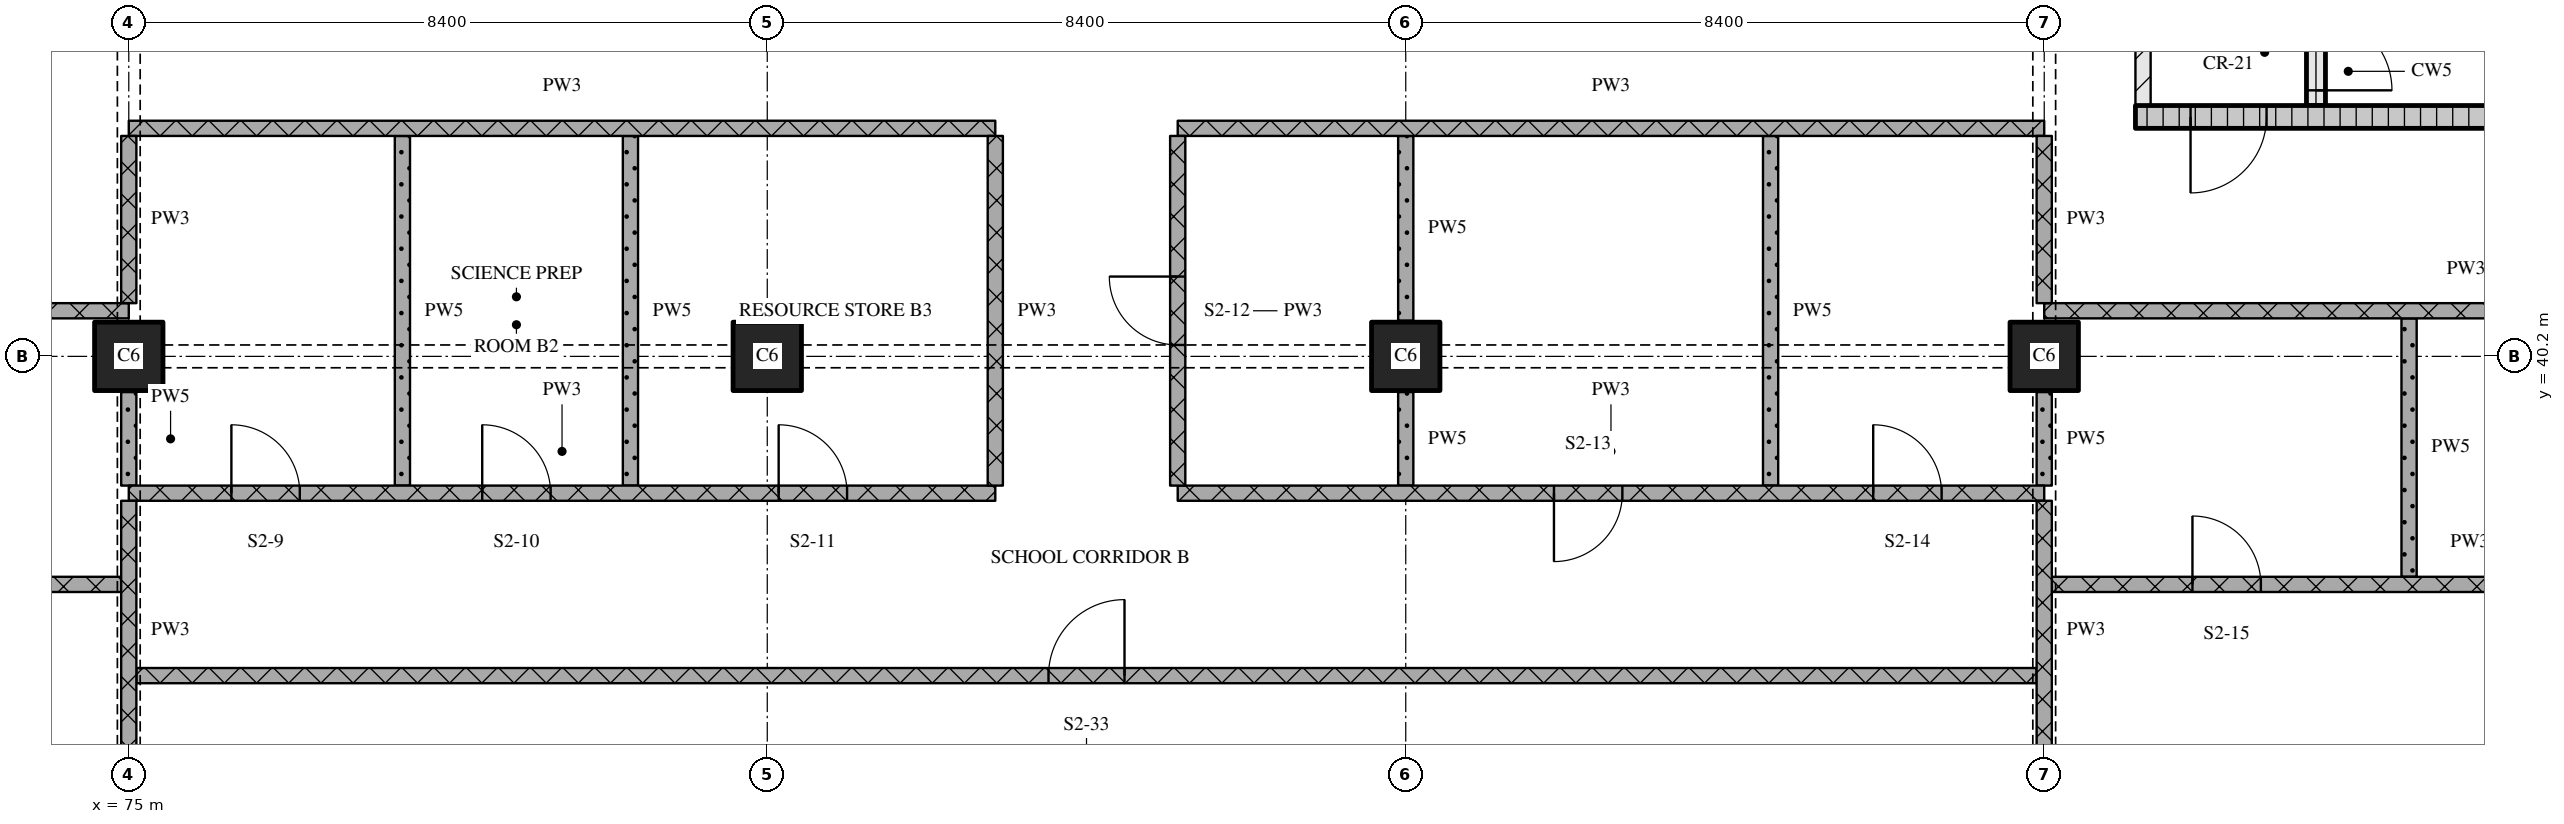
"""IFC4 building model, lengths in metres.
Left out: names, types, materials, properties, quantities, classifications, styles, units other than length and angle.
Written with IfcOpenShell. Run it as: python <this file> out.ifc"""

import sys

from ifc_helpers import new_model, si_unit, direction, frame, frame_2d, origin, origin_2d, place, context, subcontext, project, spatial, rectangle, extrude, element, fill, save


model = new_model("IFC4")
c1 = context("Model", 3, precision=1e-05, world=origin(), true_north=direction((0.0, 1.0)))
c2 = subcontext(c1, "Body", "Model", "MODEL_VIEW")
j1 = project(units=[si_unit("LENGTHUNIT", "METRE"), si_unit("PLANEANGLEUNIT", "RADIAN")], contexts=[c1])
p1 = place(None, origin())
s1 = spatial("IfcSite", under=j1, at=p1, CompositionType="ELEMENT")
p2 = place(p1, origin())
s2 = spatial("IfcBuilding", under=s1, at=p2, CompositionType="ELEMENT")
p3 = place(p2, frame((0.0, 0.0, 32.7)))
s3 = spatial("IfcBuildingStorey", under=s2, at=p3, CompositionType="ELEMENT", Elevation=32.7)
for number, where, z_axis, x_axis in (
    (1, (75.0, 40.2, 0.0), (0.0, 0.0, 1.0), (1.0, 0.0, 0.0)),
    (2, (83.4, 40.2, 0.0), (0.0, 0.0, 1.0), (1.0, 0.0, 0.0)),
    (3, (91.8, 40.2, 0.0), (0.0, 0.0, 1.0), (1.0, 0.0, 0.0)),
    (4, (100.2, 40.2, 0.0), (0.0, 0.0, 1.0), (1.0, 0.0, 0.0)),
):
    element("IfcColumn", number, at=place(p3, frame(where, z_axis=z_axis, x_axis=x_axis)), inside=s3, PredefinedType="COLUMN", context=c2, shape_type="SweptSolid", body=[
        extrude(rectangle(XDim=0.9, YDim=0.9, at=origin_2d()), origin(), (0.0, 0.0, 1.0), 4.5),
    ])
p4 = place(p3, frame((101.4, 43.35, 0.0), z_axis=(0.0, 0.0, 1.0), x_axis=(1.0, 0.0, 0.0)))
e5 = element("IfcWall", 5, at=p4, inside=s3, PredefinedType="SOLIDWALL", context=c2, shape_type="SweptSolid", body=[
    extrude(rectangle(XDim=5.6, YDim=0.3, at=frame_2d((2.8, 0.0))), origin(), (0.0, 0.0, 1.0), 4.22),
])
p5 = place(p4, frame((0.725, 0.0, 0.0)))
e6 = element("IfcOpeningElement", 6, at=p5, cuts=e5, PredefinedType="OPENING", context=c2, shape_type="SweptSolid", body=[
    extrude(rectangle(XDim=1.0, YDim=2.1, at=frame_2d((0.5, 1.05))), frame((0.0, 0.16, 0.0), z_axis=(0.0, -1.0, 0.0), x_axis=(1.0, 0.0, 0.0)), (0.0, 0.0, 1.0), 0.32),
])
p6 = place(p3, frame((101.5, 43.5, 0.0), z_axis=(0.0, 0.0, 1.0), x_axis=(0.0, 1.0, 0.0)))
e7 = element("IfcWall", 7, at=p6, inside=s3, PredefinedType="PARTITIONING", context=c2, shape_type="SweptSolid", body=[
    extrude(rectangle(XDim=6.9, YDim=0.2, at=frame_2d((3.45, 0.0))), origin(), (0.0, 0.0, 1.0), 4.22),
])
p7 = place(p6, frame((1.0, 0.0, 0.0)))
e8 = element("IfcOpeningElement", 8, at=p7, cuts=e7, PredefinedType="OPENING", context=c2, shape_type="SweptSolid", body=[
    extrude(rectangle(XDim=1.0, YDim=2.1, at=frame_2d((0.5, 1.05))), frame((0.0, 0.11, 0.0), z_axis=(0.0, -1.0, 0.0), x_axis=(1.0, 0.0, 0.0)), (0.0, 0.0, 1.0), 0.22),
])
p8 = place(p3, frame((103.775, 43.5, 0.0), z_axis=(0.0, 0.0, 1.0), x_axis=(0.0, 1.0, 0.0)))
e9 = element("IfcWall", 9, at=p8, inside=s3, PredefinedType="SOLIDWALL", context=c2, shape_type="SweptSolid", body=[
    extrude(rectangle(XDim=6.9, YDim=0.25, at=frame_2d((3.45, 0.0))), origin(), (0.0, 0.0, 1.0), 4.22),
])
p9 = place(p8, frame((0.2, 0.0, 0.0)))
e10 = element("IfcOpeningElement", 10, at=p9, cuts=e9, PredefinedType="OPENING", context=c2, shape_type="SweptSolid", body=[
    extrude(rectangle(XDim=1.0, YDim=2.1, at=frame_2d((0.5, 1.05))), frame((0.0, 0.135, 0.0), z_axis=(0.0, -1.0, 0.0), x_axis=(1.0, 0.0, 0.0)), (0.0, 0.0, 1.0), 0.27),
])
p10 = place(p3, frame((100.1, 36.0, 0.0), z_axis=(0.0, 0.0, 1.0), x_axis=(-1.0, 0.0, 0.0)))
e11 = element("IfcWall", 11, at=p10, inside=s3, PredefinedType="PARTITIONING", context=c2, shape_type="SweptSolid", body=[
    extrude(rectangle(XDim=25.0, YDim=0.2, at=frame_2d((12.5, 0.0))), origin(), (0.0, 0.0, 1.0), 4.22),
])
p11 = place(p10, frame((12.0, 0.0, 0.0)))
e12 = element("IfcOpeningElement", 12, at=p11, cuts=e11, PredefinedType="OPENING", context=c2, shape_type="SweptSolid", body=[
    extrude(rectangle(XDim=1.0, YDim=2.1, at=frame_2d((0.5, 1.05))), frame((0.0, 0.11, 0.0), z_axis=(0.0, -1.0, 0.0), x_axis=(1.0, 0.0, 0.0)), (0.0, 0.0, 1.0), 0.22),
])
p12 = place(p3, frame((63.9, 37.2, 0.0), z_axis=(0.0, 0.0, 1.0), x_axis=(1.0, 0.0, 0.0)))
e13 = element("IfcWall", 13, at=p12, inside=s3, PredefinedType="PARTITIONING", context=c2, shape_type="SweptSolid", body=[
    extrude(rectangle(XDim=11.0, YDim=0.2, at=frame_2d((5.5, 0.0))), origin(), (0.0, 0.0, 1.0), 4.22),
])
p13 = place(p12, frame((7.5, 0.0, 0.0)))
e14 = element("IfcOpeningElement", 14, at=p13, cuts=e13, PredefinedType="OPENING", context=c2, shape_type="SweptSolid", body=[
    extrude(rectangle(XDim=0.9, YDim=2.1, at=frame_2d((0.45, 1.05))), frame((0.0, 0.11, 0.0), z_axis=(0.0, -1.0, 0.0), x_axis=(1.0, 0.0, 0.0)), (0.0, 0.0, 1.0), 0.22),
])
p14 = place(p3, frame((100.3, 37.2, 0.0), z_axis=(0.0, 0.0, 1.0), x_axis=(1.0, 0.0, 0.0)))
e15 = element("IfcWall", 15, at=p14, inside=s3, PredefinedType="PARTITIONING", context=c2, shape_type="SweptSolid", body=[
    extrude(rectangle(XDim=11.0, YDim=0.2, at=frame_2d((5.5, 0.0))), origin(), (0.0, 0.0, 1.0), 4.22),
])
p15 = place(p14, frame((1.85, 0.0, 0.0)))
e16 = element("IfcOpeningElement", 16, at=p15, cuts=e15, PredefinedType="OPENING", context=c2, shape_type="SweptSolid", body=[
    extrude(rectangle(XDim=0.9, YDim=2.1, at=frame_2d((0.45, 1.05))), frame((0.0, 0.11, 0.0), z_axis=(0.0, -1.0, 0.0), x_axis=(1.0, 0.0, 0.0)), (0.0, 0.0, 1.0), 0.22),
])
p16 = place(p14, frame((7.4, 0.0, 0.0)))
e17 = element("IfcOpeningElement", 17, at=p16, cuts=e15, PredefinedType="OPENING", context=c2, shape_type="SweptSolid", body=[
    extrude(rectangle(XDim=0.9, YDim=2.1, at=frame_2d((0.45, 1.05))), frame((0.0, 0.11, 0.0), z_axis=(0.0, -1.0, 0.0), x_axis=(1.0, 0.0, 0.0)), (0.0, 0.0, 1.0), 0.22),
])
p17 = place(p3, frame((75.0, 38.4, 0.0), z_axis=(0.0, 0.0, 1.0), x_axis=(1.0, 0.0, 0.0)))
e18 = element("IfcWall", 18, at=p17, inside=s3, PredefinedType="PARTITIONING", context=c2, shape_type="SweptSolid", body=[
    extrude(rectangle(XDim=11.4, YDim=0.2, at=frame_2d((5.7, 0.0))), origin(), (0.0, 0.0, 1.0), 4.22),
])
p18 = place(p17, frame((1.35, 0.0, 0.0)))
e19 = element("IfcOpeningElement", 19, at=p18, cuts=e18, PredefinedType="OPENING", context=c2, shape_type="SweptSolid", body=[
    extrude(rectangle(XDim=0.9, YDim=2.1, at=frame_2d((0.45, 1.05))), frame((0.0, 0.11, 0.0), z_axis=(0.0, -1.0, 0.0), x_axis=(1.0, 0.0, 0.0)), (0.0, 0.0, 1.0), 0.22),
])
p19 = place(p17, frame((4.65, 0.0, 0.0)))
e20 = element("IfcOpeningElement", 20, at=p19, cuts=e18, PredefinedType="OPENING", context=c2, shape_type="SweptSolid", body=[
    extrude(rectangle(XDim=0.9, YDim=2.1, at=frame_2d((0.45, 1.05))), frame((0.0, 0.11, 0.0), z_axis=(0.0, -1.0, 0.0), x_axis=(1.0, 0.0, 0.0)), (0.0, 0.0, 1.0), 0.22),
])
p20 = place(p17, frame((8.55, 0.0, 0.0)))
e21 = element("IfcOpeningElement", 21, at=p20, cuts=e18, PredefinedType="OPENING", context=c2, shape_type="SweptSolid", body=[
    extrude(rectangle(XDim=0.9, YDim=2.1, at=frame_2d((0.45, 1.05))), frame((0.0, 0.11, 0.0), z_axis=(0.0, -1.0, 0.0), x_axis=(1.0, 0.0, 0.0)), (0.0, 0.0, 1.0), 0.22),
])
p21 = place(p3, frame((88.8, 38.4, 0.0), z_axis=(0.0, 0.0, 1.0), x_axis=(1.0, 0.0, 0.0)))
e22 = element("IfcWall", 22, at=p21, inside=s3, PredefinedType="PARTITIONING", context=c2, shape_type="SweptSolid", body=[
    extrude(rectangle(XDim=11.4, YDim=0.2, at=frame_2d((5.7, 0.0))), origin(), (0.0, 0.0, 1.0), 4.22),
])
p22 = place(p21, frame((4.95, 0.0, 0.0)))
e23 = element("IfcOpeningElement", 23, at=p22, cuts=e22, PredefinedType="OPENING", context=c2, shape_type="SweptSolid", body=[
    extrude(rectangle(XDim=0.9, YDim=2.1, at=frame_2d((0.45, 1.05))), frame((0.0, 0.11, 0.0), z_axis=(0.0, -1.0, 0.0), x_axis=(1.0, 0.0, 0.0)), (0.0, 0.0, 1.0), 0.22),
])
p23 = place(p21, frame((9.15, 0.0, 0.0)))
e24 = element("IfcOpeningElement", 24, at=p23, cuts=e22, PredefinedType="OPENING", context=c2, shape_type="SweptSolid", body=[
    extrude(rectangle(XDim=0.9, YDim=2.1, at=frame_2d((0.45, 1.05))), frame((0.0, 0.11, 0.0), z_axis=(0.0, -1.0, 0.0), x_axis=(1.0, 0.0, 0.0)), (0.0, 0.0, 1.0), 0.22),
])
for number, where, z_axis, x_axis in (
    (25, (63.9, 40.8, 0.0), (0.0, 0.0, 1.0), (1.0, 0.0, 0.0)),
    (26, (100.2, 40.8, 0.0), (0.0, 0.0, 1.0), (1.0, 0.0, 0.0)),
):
    element("IfcWall", number, at=place(p3, frame(where, z_axis=z_axis, x_axis=x_axis)), inside=s3, PredefinedType="PARTITIONING", context=c2, shape_type="SweptSolid", body=[
        extrude(rectangle(XDim=11.1, YDim=0.2, at=frame_2d((5.55, 0.0))), origin(), (0.0, 0.0, 1.0), 4.22),
    ])
for number, where, z_axis, x_axis in (
    (27, (75.0, 43.2, 0.0), (0.0, 0.0, 1.0), (1.0, 0.0, 0.0)),
    (28, (88.8, 43.2, 0.0), (0.0, 0.0, 1.0), (1.0, 0.0, 0.0)),
):
    element("IfcWall", number, at=place(p3, frame(where, z_axis=z_axis, x_axis=x_axis)), inside=s3, PredefinedType="PARTITIONING", context=c2, shape_type="SweptSolid", body=[
        extrude(rectangle(XDim=11.4, YDim=0.2, at=frame_2d((5.7, 0.0))), origin(), (0.0, 0.0, 1.0), 4.22),
    ])
p24 = place(p3, frame((75.0, 38.3, 0.0), z_axis=(0.0, 0.0, 1.0), x_axis=(0.0, -1.0, 0.0)))
e29 = element("IfcWall", 29, at=p24, inside=s3, PredefinedType="PARTITIONING", context=c2, shape_type="SweptSolid", body=[
    extrude(rectangle(XDim=3.4, YDim=0.2, at=frame_2d((1.7, 0.0))), origin(), (0.0, 0.0, 1.0), 3.73),
])
p25 = place(p3, frame((75.0, 43.1, 0.0), z_axis=(0.0, 0.0, 1.0), x_axis=(0.0, -1.0, 0.0)))
e30 = element("IfcWall", 30, at=p25, inside=s3, PredefinedType="PARTITIONING", context=c2, shape_type="SweptSolid", body=[
    extrude(rectangle(XDim=2.2, YDim=0.2, at=frame_2d((1.1, 0.0))), origin(), (0.0, 0.0, 1.0), 3.33),
])
p26 = place(p3, frame((75.0, 39.73, 0.0), z_axis=(0.0, 0.0, 1.0), x_axis=(0.0, -1.0, 0.0)))
e31 = element("IfcWall", 31, at=p26, inside=s3, PredefinedType="PARTITIONING", context=c2, shape_type="SweptSolid", body=[
    extrude(rectangle(XDim=1.23, YDim=0.2, at=frame_2d((0.615, 0.0))), origin(), (0.0, 0.0, 1.0), 3.73),
])
for number, where, z_axis, x_axis in (
    (32, (78.6, 43.1, 0.0), (0.0, 0.0, 1.0), (0.0, -1.0, 0.0)),
    (33, (81.6, 43.1, 0.0), (0.0, 0.0, 1.0), (0.0, -1.0, 0.0)),
    (34, (86.4, 43.1, 0.0), (0.0, 0.0, 1.0), (0.0, -1.0, 0.0)),
):
    element("IfcWall", number, at=place(p3, frame(where, z_axis=z_axis, x_axis=x_axis)), inside=s3, PredefinedType="PARTITIONING", context=c2, shape_type="SweptSolid", body=[
        extrude(rectangle(XDim=4.6, YDim=0.2, at=frame_2d((2.3, 0.0))), origin(), (0.0, 0.0, 1.0), 4.22),
    ])
p27 = place(p3, frame((88.8, 43.1, 0.0), z_axis=(0.0, 0.0, 1.0), x_axis=(0.0, -1.0, 0.0)))
e35 = element("IfcWall", 35, at=p27, inside=s3, PredefinedType="PARTITIONING", context=c2, shape_type="SweptSolid", body=[
    extrude(rectangle(XDim=4.6, YDim=0.2, at=frame_2d((2.3, 0.0))), origin(), (0.0, 0.0, 1.0), 4.22),
])
p28 = place(p27, frame((1.85, 0.0, 0.0)))
e36 = element("IfcOpeningElement", 36, at=p28, cuts=e35, PredefinedType="OPENING", context=c2, shape_type="SweptSolid", body=[
    extrude(rectangle(XDim=0.9, YDim=2.1, at=frame_2d((0.45, 1.05))), frame((0.0, 0.11, 0.0), z_axis=(0.0, -1.0, 0.0), x_axis=(1.0, 0.0, 0.0)), (0.0, 0.0, 1.0), 0.22),
])
p29 = place(p3, frame((91.8, 39.73, 0.0), z_axis=(0.0, 0.0, 1.0), x_axis=(0.0, -1.0, 0.0)))
e37 = element("IfcWall", 37, at=p29, inside=s3, PredefinedType="PARTITIONING", context=c2, shape_type="SweptSolid", body=[
    extrude(rectangle(XDim=1.23, YDim=0.2, at=frame_2d((0.615, 0.0))), origin(), (0.0, 0.0, 1.0), 4.22),
])
p30 = place(p3, frame((91.8, 43.1, 0.0), z_axis=(0.0, 0.0, 1.0), x_axis=(0.0, -1.0, 0.0)))
e38 = element("IfcWall", 38, at=p30, inside=s3, PredefinedType="PARTITIONING", context=c2, shape_type="SweptSolid", body=[
    extrude(rectangle(XDim=2.43, YDim=0.2, at=frame_2d((1.215, 0.0))), origin(), (0.0, 0.0, 1.0), 4.22),
])
p31 = place(p3, frame((96.6, 43.1, 0.0), z_axis=(0.0, 0.0, 1.0), x_axis=(0.0, -1.0, 0.0)))
e39 = element("IfcWall", 39, at=p31, inside=s3, PredefinedType="PARTITIONING", context=c2, shape_type="SweptSolid", body=[
    extrude(rectangle(XDim=4.6, YDim=0.2, at=frame_2d((2.3, 0.0))), origin(), (0.0, 0.0, 1.0), 4.22),
])
p32 = place(p3, frame((100.2, 38.3, 0.0), z_axis=(0.0, 0.0, 1.0), x_axis=(0.0, -1.0, 0.0)))
e40 = element("IfcWall", 40, at=p32, inside=s3, PredefinedType="PARTITIONING", context=c2, shape_type="SweptSolid", body=[
    extrude(rectangle(XDim=3.4, YDim=0.2, at=frame_2d((1.7, 0.0))), origin(), (0.0, 0.0, 1.0), 3.73),
])
p33 = place(p3, frame((100.2, 43.1, 0.0), z_axis=(0.0, 0.0, 1.0), x_axis=(0.0, -1.0, 0.0)))
e41 = element("IfcWall", 41, at=p33, inside=s3, PredefinedType="PARTITIONING", context=c2, shape_type="SweptSolid", body=[
    extrude(rectangle(XDim=2.2, YDim=0.2, at=frame_2d((1.1, 0.0))), origin(), (0.0, 0.0, 1.0), 3.33),
])
p34 = place(p3, frame((100.2, 39.73, 0.0), z_axis=(0.0, 0.0, 1.0), x_axis=(0.0, -1.0, 0.0)))
e42 = element("IfcWall", 42, at=p34, inside=s3, PredefinedType="PARTITIONING", context=c2, shape_type="SweptSolid", body=[
    extrude(rectangle(XDim=1.23, YDim=0.2, at=frame_2d((0.615, 0.0))), origin(), (0.0, 0.0, 1.0), 3.73),
])
p35 = place(p3, frame((105.0, 40.7, 0.0), z_axis=(0.0, 0.0, 1.0), x_axis=(0.0, -1.0, 0.0)))
e43 = element("IfcWall", 43, at=p35, inside=s3, PredefinedType="PARTITIONING", context=c2, shape_type="SweptSolid", body=[
    extrude(rectangle(XDim=3.4, YDim=0.2, at=frame_2d((1.7, 0.0))), origin(), (0.0, 0.0, 1.0), 4.22),
])
p36 = place(p5, origin())
e44 = element("IfcDoor", 44, at=p36, inside=s3, OperationType="SINGLE_SWING_RIGHT", PredefinedType="DOOR", context=c2, shape_type="SweptSolid", body=[
    extrude(rectangle(XDim=1.0, YDim=2.1, at=frame_2d((0.5, 1.05))), frame((0.0, 0.025, 0.0), z_axis=(0.0, -1.0, 0.0), x_axis=(1.0, 0.0, 0.0)), (0.0, 0.0, 1.0), 0.05),
])
fill(e6, e44)
p37 = place(p9, origin())
e45 = element("IfcDoor", 45, at=p37, inside=s3, OperationType="SINGLE_SWING_RIGHT", PredefinedType="DOOR", context=c2, shape_type="SweptSolid", body=[
    extrude(rectangle(XDim=1.0, YDim=2.1, at=frame_2d((0.5, 1.05))), frame((0.0, 0.025, 0.0), z_axis=(0.0, -1.0, 0.0), x_axis=(1.0, 0.0, 0.0)), (0.0, 0.0, 1.0), 0.05),
])
fill(e10, e45)
p38 = place(p11, origin())
e46 = element("IfcDoor", 46, at=p38, inside=s3, OperationType="SINGLE_SWING_RIGHT", PredefinedType="DOOR", context=c2, shape_type="SweptSolid", body=[
    extrude(rectangle(XDim=1.0, YDim=2.1, at=frame_2d((0.5, 1.05))), frame((0.0, 0.025, 0.0), z_axis=(0.0, -1.0, 0.0), x_axis=(1.0, 0.0, 0.0)), (0.0, 0.0, 1.0), 0.05),
])
fill(e12, e46)
p39 = place(p15, origin())
e47 = element("IfcDoor", 47, at=p39, inside=s3, OperationType="SINGLE_SWING_LEFT", PredefinedType="DOOR", context=c2, shape_type="SweptSolid", body=[
    extrude(rectangle(XDim=0.9, YDim=2.1, at=frame_2d((0.45, 1.05))), frame((0.0, 0.025, 0.0), z_axis=(0.0, -1.0, 0.0), x_axis=(1.0, 0.0, 0.0)), (0.0, 0.0, 1.0), 0.05),
])
fill(e16, e47)
p40 = place(p18, origin())
e48 = element("IfcDoor", 48, at=p40, inside=s3, OperationType="SINGLE_SWING_LEFT", PredefinedType="DOOR", context=c2, shape_type="SweptSolid", body=[
    extrude(rectangle(XDim=0.9, YDim=2.1, at=frame_2d((0.45, 1.05))), frame((0.0, 0.025, 0.0), z_axis=(0.0, -1.0, 0.0), x_axis=(1.0, 0.0, 0.0)), (0.0, 0.0, 1.0), 0.05),
])
fill(e19, e48)
p41 = place(p19, origin())
e49 = element("IfcDoor", 49, at=p41, inside=s3, OperationType="SINGLE_SWING_LEFT", PredefinedType="DOOR", context=c2, shape_type="SweptSolid", body=[
    extrude(rectangle(XDim=0.9, YDim=2.1, at=frame_2d((0.45, 1.05))), frame((0.0, 0.025, 0.0), z_axis=(0.0, -1.0, 0.0), x_axis=(1.0, 0.0, 0.0)), (0.0, 0.0, 1.0), 0.05),
])
fill(e20, e49)
p42 = place(p20, origin())
e50 = element("IfcDoor", 50, at=p42, inside=s3, OperationType="SINGLE_SWING_LEFT", PredefinedType="DOOR", context=c2, shape_type="SweptSolid", body=[
    extrude(rectangle(XDim=0.9, YDim=2.1, at=frame_2d((0.45, 1.05))), frame((0.0, 0.025, 0.0), z_axis=(0.0, -1.0, 0.0), x_axis=(1.0, 0.0, 0.0)), (0.0, 0.0, 1.0), 0.05),
])
fill(e21, e50)
p43 = place(p22, origin())
e51 = element("IfcDoor", 51, at=p43, inside=s3, OperationType="SINGLE_SWING_RIGHT", PredefinedType="DOOR", context=c2, shape_type="SweptSolid", body=[
    extrude(rectangle(XDim=0.9, YDim=2.1, at=frame_2d((0.45, 1.05))), frame((0.0, 0.025, 0.0), z_axis=(0.0, -1.0, 0.0), x_axis=(1.0, 0.0, 0.0)), (0.0, 0.0, 1.0), 0.05),
])
fill(e23, e51)
p44 = place(p23, origin())
e52 = element("IfcDoor", 52, at=p44, inside=s3, OperationType="SINGLE_SWING_LEFT", PredefinedType="DOOR", context=c2, shape_type="SweptSolid", body=[
    extrude(rectangle(XDim=0.9, YDim=2.1, at=frame_2d((0.45, 1.05))), frame((0.0, 0.025, 0.0), z_axis=(0.0, -1.0, 0.0), x_axis=(1.0, 0.0, 0.0)), (0.0, 0.0, 1.0), 0.05),
])
fill(e24, e52)
p45 = place(p28, origin())
e53 = element("IfcDoor", 53, at=p45, inside=s3, OperationType="SINGLE_SWING_RIGHT", PredefinedType="DOOR", context=c2, shape_type="SweptSolid", body=[
    extrude(rectangle(XDim=0.9, YDim=2.1, at=frame_2d((0.45, 1.05))), frame((0.0, 0.025, 0.0), z_axis=(0.0, -1.0, 0.0), x_axis=(1.0, 0.0, 0.0)), (0.0, 0.0, 1.0), 0.05),
])
fill(e36, e53)
save(model, sys.argv[1])
